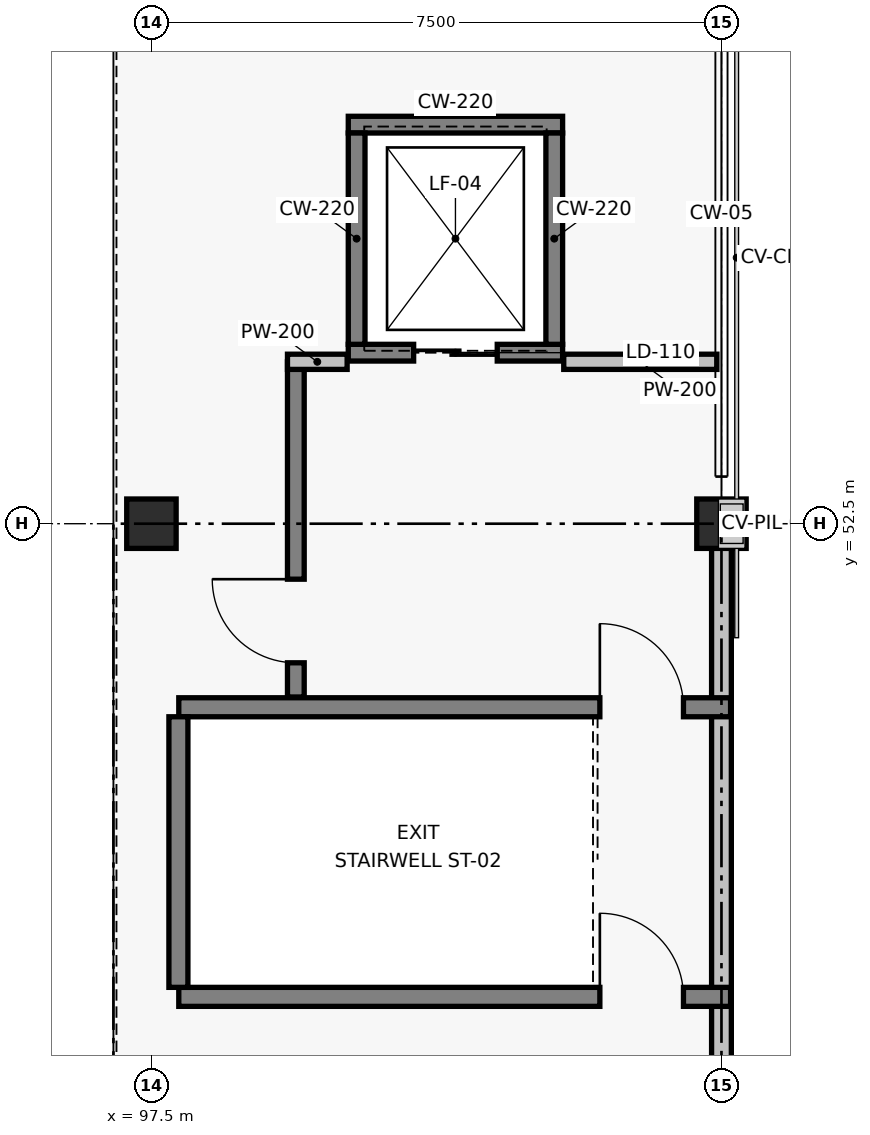
"""IFC4 building model, lengths in metres.
Left out: names, types, materials, properties, quantities, classifications, styles, units other than length and angle.
Written with IfcOpenShell. Run it as: python <this file> out.ifc"""

import sys

from ifc_helpers import new_model, si_unit, direction, frame, frame_2d, origin, origin_2d, place, context, subcontext, project, spatial, rectangle, extrude, element, fill, save


model = new_model("IFC4")
c1 = context("Model", 3, precision=1e-05, world=origin(), true_north=direction((0.0, 1.0)))
c2 = subcontext(c1, "Body", "Model", "MODEL_VIEW")
j1 = project(units=[si_unit("LENGTHUNIT", "METRE"), si_unit("PLANEANGLEUNIT", "RADIAN")], contexts=[c1])
p1 = place(None, origin())
s1 = spatial("IfcSite", under=j1, at=p1, CompositionType="ELEMENT")
p2 = place(p1, origin())
s2 = spatial("IfcBuilding", under=s1, at=p2, CompositionType="ELEMENT")
p3 = place(p2, frame((0.0, 0.0, 21.0)))
s3 = spatial("IfcBuildingStorey", under=s2, at=p3, CompositionType="ELEMENT", Elevation=21.0)
for number, where, z_axis, x_axis in (
    (1, (97.5, 52.5, 0.0), (0.0, 0.0, 1.0), (1.0, 0.0, 0.0)),
    (2, (105.0, 52.5, 0.0), (0.0, 0.0, 1.0), (1.0, 0.0, 0.0)),
):
    element("IfcColumn", number, at=place(p3, frame(where, z_axis=z_axis, x_axis=x_axis)), inside=s3, PredefinedType="COLUMN", context=c2, shape_type="SweptSolid", body=[
        extrude(rectangle(XDim=0.65, YDim=0.65, at=origin_2d()), origin(), (0.0, 0.0, 1.0), 4.2),
    ])
p4 = place(p3, frame((105.0, 45.3, 0.0), z_axis=(0.0, 0.0, 1.0), x_axis=(0.0, 1.0, 0.0)))
e3 = element("IfcWall", 3, at=p4, inside=s3, PredefinedType="SOLIDWALL", context=c2, shape_type="SweptSolid", body=[
    extrude(rectangle(XDim=6.9, YDim=0.26, at=frame_2d((3.45, 0.0))), origin(), (0.0, 0.0, 1.0), 2.94),
])
p5 = place(p3, frame((97.86, 46.275, 0.0), z_axis=(0.0, 0.0, 1.0), x_axis=(1.0, 0.0, 0.0)))
e4 = element("IfcWall", 4, at=p5, inside=s3, PredefinedType="SOLIDWALL", context=c2, shape_type="SweptSolid", body=[
    extrude(rectangle(XDim=7.26, YDim=0.25, at=frame_2d((3.63, 0.0))), origin(), (0.0, 0.0, 1.0), 3.92),
])
p6 = place(p5, frame((5.54, 0.0, 0.0)))
e5 = element("IfcOpeningElement", 5, at=p6, cuts=e4, PredefinedType="OPENING", context=c2, shape_type="SweptSolid", body=[
    extrude(rectangle(XDim=1.1, YDim=2.15, at=frame_2d((0.55, 1.075))), frame((0.0, 0.135, 0.0), z_axis=(0.0, -1.0, 0.0), x_axis=(1.0, 0.0, 0.0)), (0.0, 0.0, 1.0), 0.27),
])
p7 = place(p3, frame((97.86, 50.085, 0.0), z_axis=(0.0, 0.0, 1.0), x_axis=(1.0, 0.0, 0.0)))
e6 = element("IfcWall", 6, at=p7, inside=s3, PredefinedType="SOLIDWALL", context=c2, shape_type="SweptSolid", body=[
    extrude(rectangle(XDim=7.26, YDim=0.25, at=frame_2d((3.63, 0.0))), origin(), (0.0, 0.0, 1.0), 3.92),
])
p8 = place(p7, frame((5.54, 0.0, 0.0)))
e7 = element("IfcOpeningElement", 7, at=p8, cuts=e6, PredefinedType="OPENING", context=c2, shape_type="SweptSolid", body=[
    extrude(rectangle(XDim=1.1, YDim=2.15, at=frame_2d((0.55, 1.075))), frame((0.0, 0.135, 0.0), z_axis=(0.0, -1.0, 0.0), x_axis=(1.0, 0.0, 0.0)), (0.0, 0.0, 1.0), 0.27),
])
p9 = place(p3, frame((97.855, 46.4, 0.0), z_axis=(0.0, 0.0, 1.0), x_axis=(0.0, 1.0, 0.0)))
e8 = element("IfcWall", 8, at=p9, inside=s3, PredefinedType="SOLIDWALL", context=c2, shape_type="SweptSolid", body=[
    extrude(rectangle(XDim=3.56, YDim=0.25, at=frame_2d((1.78, 0.0))), origin(), (0.0, 0.0, 1.0), 3.92),
])
p10 = place(p3, frame((100.09, 54.75, 0.0), z_axis=(0.0, 0.0, 1.0), x_axis=(1.0, 0.0, 0.0)))
e9 = element("IfcWall", 9, at=p10, inside=s3, PredefinedType="SOLIDWALL", context=c2, shape_type="SweptSolid", body=[
    extrude(rectangle(XDim=2.82, YDim=0.22, at=frame_2d((1.41, 0.0))), origin(), (0.0, 0.0, 1.0), 3.92),
])
p11 = place(p10, frame((0.86, 0.0, 0.0)))
e10 = element("IfcOpeningElement", 10, at=p11, cuts=e9, PredefinedType="OPENING", context=c2, shape_type="SweptSolid", body=[
    extrude(rectangle(XDim=1.1, YDim=2.15, at=frame_2d((0.55, 1.075))), frame((0.0, 0.12, 0.0), z_axis=(0.0, -1.0, 0.0), x_axis=(1.0, 0.0, 0.0)), (0.0, 0.0, 1.0), 0.24),
])
p12 = place(p3, frame((100.09, 57.75, 0.0), z_axis=(0.0, 0.0, 1.0), x_axis=(1.0, 0.0, 0.0)))
e11 = element("IfcWall", 11, at=p12, inside=s3, PredefinedType="SOLIDWALL", context=c2, shape_type="SweptSolid", body=[
    extrude(rectangle(XDim=2.82, YDim=0.22, at=frame_2d((1.41, 0.0))), origin(), (0.0, 0.0, 1.0), 3.92),
])
for number, where, z_axis, x_axis in (
    (12, (100.2, 54.86, 0.0), (0.0, 0.0, 1.0), (0.0, 1.0, 0.0)),
    (13, (102.8, 54.86, 0.0), (0.0, 0.0, 1.0), (0.0, 1.0, 0.0)),
):
    element("IfcWall", number, at=place(p3, frame(where, z_axis=z_axis, x_axis=x_axis)), inside=s3, PredefinedType="SOLIDWALL", context=c2, shape_type="SweptSolid", body=[
        extrude(rectangle(XDim=2.78, YDim=0.22, at=frame_2d((1.39, 0.0))), origin(), (0.0, 0.0, 1.0), 3.92),
    ])
p13 = place(p3, frame((99.4, 50.22, 0.0), z_axis=(0.0, 0.0, 1.0), x_axis=(0.0, 1.0, 0.0)))
e14 = element("IfcWall", 14, at=p13, inside=s3, PredefinedType="SOLIDWALL", context=c2, shape_type="SweptSolid", body=[
    extrude(rectangle(XDim=4.41, YDim=0.22, at=frame_2d((2.205, 0.0))), origin(), (0.0, 0.0, 1.0), 3.92),
])
p14 = place(p13, frame((0.45, 0.0, 0.0)))
e15 = element("IfcOpeningElement", 15, at=p14, cuts=e14, PredefinedType="OPENING", context=c2, shape_type="SweptSolid", body=[
    extrude(rectangle(XDim=1.1, YDim=2.15, at=frame_2d((0.55, 1.075))), frame((0.0, 0.12, 0.0), z_axis=(0.0, -1.0, 0.0), x_axis=(1.0, 0.0, 0.0)), (0.0, 0.0, 1.0), 0.24),
])
p15 = place(p3, frame((99.29, 54.63, 0.0), z_axis=(0.0, 0.0, 1.0), x_axis=(1.0, 0.0, 0.0)))
e16 = element("IfcWall", 16, at=p15, inside=s3, PredefinedType="PARTITIONING", context=c2, shape_type="SweptSolid", body=[
    extrude(rectangle(XDim=0.785, YDim=0.2, at=frame_2d((0.393, 0.0))), origin(), (0.0, 0.0, 1.0), 3.9),
])
p16 = place(p3, frame((102.925, 54.63, 0.0), z_axis=(0.0, 0.0, 1.0), x_axis=(1.0, 0.0, 0.0)))
e17 = element("IfcWall", 17, at=p16, inside=s3, PredefinedType="PARTITIONING", context=c2, shape_type="SweptSolid", body=[
    extrude(rectangle(XDim=2.015, YDim=0.2, at=frame_2d((1.007, 0.0))), origin(), (0.0, 0.0, 1.0), 3.48),
])
p17 = place(p6, origin())
e18 = element("IfcDoor", 18, at=p17, inside=s3, OperationType="SINGLE_SWING_LEFT", PredefinedType="DOOR", context=c2, shape_type="SweptSolid", body=[
    extrude(rectangle(XDim=1.1, YDim=2.15, at=frame_2d((0.55, 1.075))), frame((0.0, 0.025, 0.0), z_axis=(0.0, -1.0, 0.0), x_axis=(1.0, 0.0, 0.0)), (0.0, 0.0, 1.0), 0.05),
])
fill(e5, e18)
p18 = place(p8, frame((1.1, 0.0, 0.0), z_axis=(0.0, 0.0, 1.0), x_axis=(-1.0, 0.0, 0.0)))
e19 = element("IfcDoor", 19, at=p18, inside=s3, OperationType="SINGLE_SWING_RIGHT", PredefinedType="DOOR", context=c2, shape_type="SweptSolid", body=[
    extrude(rectangle(XDim=1.1, YDim=2.15, at=frame_2d((0.55, 1.075))), frame((0.0, 0.025, 0.0), z_axis=(0.0, -1.0, 0.0), x_axis=(1.0, 0.0, 0.0)), (0.0, 0.0, 1.0), 0.05),
])
fill(e7, e19)
p19 = place(p11, origin())
e20 = element("IfcDoor", 20, at=p19, inside=s3, OperationType="SLIDING_TO_LEFT", PredefinedType="DOOR", context=c2, shape_type="SweptSolid", body=[
    extrude(rectangle(XDim=1.1, YDim=2.15, at=frame_2d((0.55, 1.075))), frame((0.0, 0.025, 0.0), z_axis=(0.0, -1.0, 0.0), x_axis=(1.0, 0.0, 0.0)), (0.0, 0.0, 1.0), 0.05),
])
fill(e10, e20)
p20 = place(p14, origin())
e21 = element("IfcDoor", 21, at=p20, inside=s3, OperationType="SINGLE_SWING_RIGHT", PredefinedType="DOOR", context=c2, shape_type="SweptSolid", body=[
    extrude(rectangle(XDim=1.1, YDim=2.15, at=frame_2d((0.55, 1.075))), frame((0.0, 0.025, 0.0), z_axis=(0.0, -1.0, 0.0), x_axis=(1.0, 0.0, 0.0)), (0.0, 0.0, 1.0), 0.05),
])
fill(e15, e21)
save(model, sys.argv[1])
